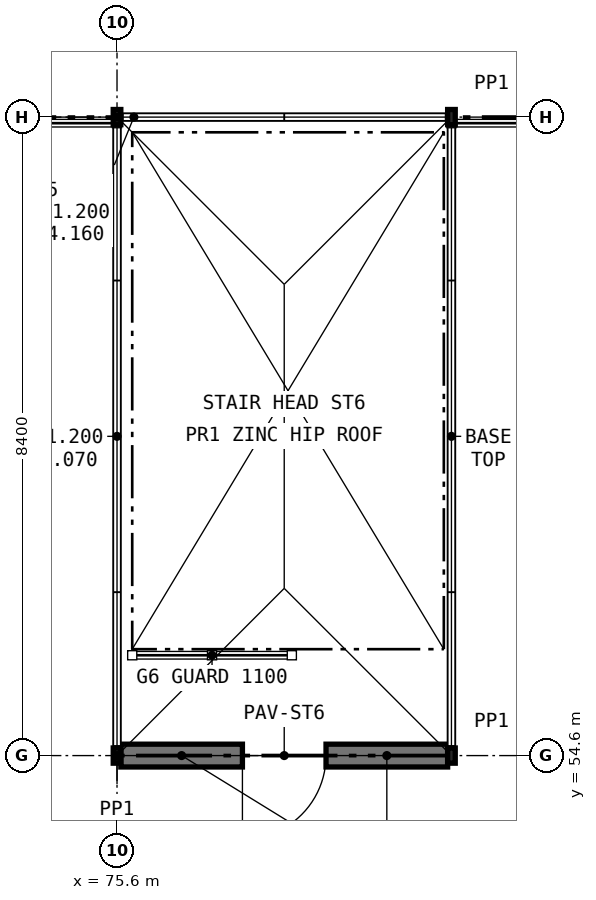
"""IFC4 building model, lengths in metres.
Left out: names, types, materials, properties, quantities, classifications, styles, units other than length and angle.
Written with IfcOpenShell. Run it as: python <this file> out.ifc"""

import sys

from ifc_helpers import new_model, si_unit, direction, frame, frame_2d, origin, origin_2d, place, context, subcontext, project, spatial, rectangle, hollow_rectangle, extrude, element, fill, save


model = new_model("IFC4")
c1 = context("Model", 3, precision=1e-05, world=origin(), true_north=direction((0.0, 1.0)))
c2 = subcontext(c1, "Body", "Model", "MODEL_VIEW")
j1 = project(units=[si_unit("LENGTHUNIT", "METRE"), si_unit("PLANEANGLEUNIT", "RADIAN")], contexts=[c1])
p1 = place(None, origin())
s1 = spatial("IfcSite", under=j1, at=p1, CompositionType="ELEMENT")
p2 = place(p1, origin())
s2 = spatial("IfcBuilding", under=s1, at=p2, CompositionType="ELEMENT")
p3 = place(p2, frame((0.0, 0.0, 31.2)))
s3 = spatial("IfcBuildingStorey", under=s2, at=p3, CompositionType="ELEMENT", Elevation=31.2)
p4 = place(p3, frame((75.6, 63.0, 0.0), z_axis=(0.0, 0.0, 1.0), x_axis=(1.0, 0.0, 0.0)))
e1 = element("IfcColumn", 1, at=p4, inside=s3, PredefinedType="COLUMN", context=c2, shape_type="SweptSolid", body=[
    extrude(hollow_rectangle(XDim=0.1, YDim=0.2, WallThickness=0.008, at=origin_2d()), origin(), (0.0, 0.0, 1.0), 3.2),
])
p5 = place(p3, frame((80.0, 63.0, -0.2), z_axis=(0.0, 0.0, 1.0), x_axis=(1.0, 0.0, 0.0)))
e2 = element("IfcColumn", 2, at=p5, inside=s3, PredefinedType="COLUMN", context=c2, shape_type="SweptSolid", body=[
    extrude(hollow_rectangle(XDim=0.1, YDim=0.2, WallThickness=0.008, at=origin_2d()), origin(), (0.0, 0.0, 1.0), 3.4),
])
p6 = place(p3, frame((75.6, 54.6, 0.0), z_axis=(0.0, 0.0, 1.0), x_axis=(1.0, 0.0, 0.0)))
e3 = element("IfcColumn", 3, at=p6, inside=s3, PredefinedType="COLUMN", context=c2, shape_type="SweptSolid", body=[
    extrude(hollow_rectangle(XDim=0.1, YDim=0.2, WallThickness=0.008, at=origin_2d()), origin(), (0.0, 0.0, 1.0), 3.2),
])
p7 = place(p3, frame((80.0, 54.6, -0.2), z_axis=(0.0, 0.0, 1.0), x_axis=(1.0, 0.0, 0.0)))
e4 = element("IfcColumn", 4, at=p7, inside=s3, PredefinedType="COLUMN", context=c2, shape_type="SweptSolid", body=[
    extrude(hollow_rectangle(XDim=0.1, YDim=0.2, WallThickness=0.008, at=origin_2d()), origin(), (0.0, 0.0, 1.0), 3.4),
])
p8 = place(p3, frame((75.65, 54.6, 0.0), z_axis=(0.0, 0.0, 1.0), x_axis=(1.0, 0.0, 0.0)))
e5 = element("IfcWall", 5, at=p8, inside=s3, PredefinedType="STANDARD", context=c2, shape_type="SweptSolid", body=[
    extrude(rectangle(XDim=4.3, YDim=0.3, at=frame_2d((2.15, 0.0))), origin(), (0.0, 0.0, 1.0), 3.2),
])
p9 = place(p8, frame((1.6, 0.0, 0.0)))
e6 = element("IfcOpeningElement", 6, at=p9, cuts=e5, PredefinedType="OPENING", context=c2, shape_type="SweptSolid", body=[
    extrude(rectangle(XDim=1.1, YDim=2.1, at=frame_2d((0.55, 1.05))), frame((0.0, 0.16, 0.0), z_axis=(0.0, -1.0, 0.0), x_axis=(1.0, 0.0, 0.0)), (0.0, 0.0, 1.0), 0.32),
])
p10 = place(p9, frame((1.1, 0.0, 0.0), z_axis=(0.0, 0.0, 1.0), x_axis=(-1.0, 0.0, 0.0)))
e7 = element("IfcDoor", 7, at=p10, inside=s3, OperationType="SINGLE_SWING_RIGHT", PredefinedType="DOOR", context=c2, shape_type="SweptSolid", body=[
    extrude(rectangle(XDim=1.1, YDim=2.1, at=frame_2d((0.55, 1.05))), frame((0.0, 0.025, 0.0), z_axis=(0.0, -1.0, 0.0), x_axis=(1.0, 0.0, 0.0)), (0.0, 0.0, 1.0), 0.05),
])
fill(e6, e7)
save(model, sys.argv[1])
